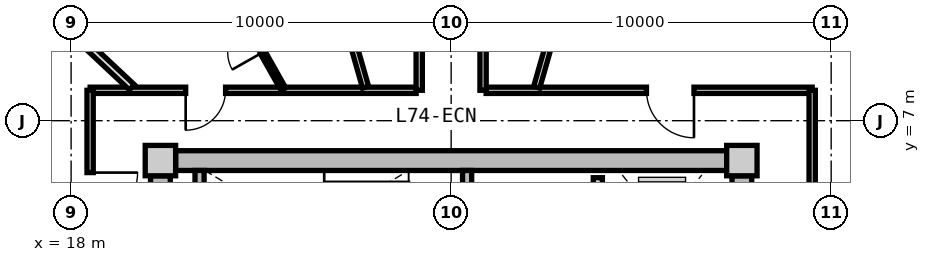
"""IFC4 building model, lengths in metres.
Left out: names, types, materials, properties, quantities, classifications, styles, units other than length and angle.
Written with IfcOpenShell. Run it as: python <this file> out.ifc"""

import sys

from ifc_helpers import new_model, si_unit, direction, frame, frame_2d, origin, origin_2d, place, context, subcontext, project, spatial, rectangle, extrude, source, transform, mapped, element, fill, save


model = new_model("IFC4")
c1 = context("Model", 3, precision=1e-05, world=origin(), true_north=direction((0.0, 1.0)))
c2 = subcontext(c1, "Body", "Model", "MODEL_VIEW")
j1 = project(units=[si_unit("LENGTHUNIT", "METRE"), si_unit("PLANEANGLEUNIT", "RADIAN")], contexts=[c1])
p1 = place(None, origin())
s1 = spatial("IfcSite", under=j1, at=p1, CompositionType="ELEMENT")
p2 = place(p1, origin())
s2 = spatial("IfcBuilding", under=s1, at=p2, CompositionType="ELEMENT")
p3 = place(p2, frame((0.0, 0.0, 238.3)))
s3 = spatial("IfcBuildingStorey", under=s2, at=p3, CompositionType="ELEMENT", Elevation=238.3)
m1 = source(origin(), c2, "Body", "SweptSolid", [
    extrude(rectangle(XDim=0.8, YDim=0.8, at=origin_2d()), origin(), (0.0, 0.0, 1.0), 3.05),
])
for number, where, z_axis, x_axis in (
    (1, (35.65, 5.95, 0.0), (0.0, 0.0, 1.0), (1.0, 0.0, 0.0)),
    (2, (20.35, 5.95, 0.0), (0.0, 0.0, 1.0), (1.0, 0.0, 0.0)),
):
    element("IfcColumn", number, at=place(p3, frame(where, z_axis=z_axis, x_axis=x_axis)), inside=s3, PredefinedType="COLUMN", context=c2, shape_type="MappedRepresentation", body=[
        mapped(m1, transform((0.0, 0.0, 0.0), x_axis=(1.0, 0.0, 0.0), y_axis=(0.0, 1.0, 0.0), z_axis=(0.0, 0.0, 1.0), scale=1.0)),
    ])
m2 = source(origin(), c2, "Body", "SweptSolid", [
    extrude(rectangle(XDim=14.5, YDim=0.52, at=frame_2d((7.25, 0.0))), origin(), (0.0, 0.0, 1.0), 2.81),
])
p4 = place(p3, frame((20.75, 5.95, 0.0), z_axis=(0.0, 0.0, 1.0), x_axis=(1.0, 0.0, 0.0)))
e3 = element("IfcWall", 3, at=p4, inside=s3, PredefinedType="SHEAR", context=c2, shape_type="MappedRepresentation", body=[
    mapped(m2, transform((0.0, 0.0, 0.0), x_axis=(1.0, 0.0, 0.0), y_axis=(0.0, 1.0, 0.0), z_axis=(0.0, 0.0, 1.0), scale=1.0)),
])
m3 = source(origin(), c2, "Body", "SweptSolid", [
    extrude(rectangle(XDim=11.1, YDim=0.52, at=frame_2d((5.55, 0.0))), origin(), (0.0, 0.0, 1.0), 2.81),
])
p5 = place(p3, frame((20.35, -5.55, 0.0), z_axis=(0.0, 0.0, 1.0), x_axis=(0.0, 1.0, 0.0)))
e4 = element("IfcWall", 4, at=p5, inside=s3, PredefinedType="SHEAR", context=c2, shape_type="MappedRepresentation", body=[
    mapped(m3, transform((0.0, 0.0, 0.0), x_axis=(1.0, 0.0, 0.0), y_axis=(0.0, 1.0, 0.0), z_axis=(0.0, 0.0, 1.0), scale=1.0)),
])
p6 = place(p5, frame((3.8, 0.0, 0.0)))
e5 = element("IfcOpeningElement", 5, at=p6, cuts=e4, PredefinedType="OPENING", context=c2, shape_type="SweptSolid", body=[
    extrude(rectangle(XDim=1.2, YDim=2.15, at=frame_2d((0.6, 1.075))), frame((0.0, 0.27, 0.0), z_axis=(0.0, -1.0, 0.0), x_axis=(1.0, 0.0, 0.0)), (0.0, 0.0, 1.0), 0.54),
])
p7 = place(p3, frame((35.65, 5.55, 0.0), z_axis=(0.0, 0.0, 1.0), x_axis=(0.0, -1.0, 0.0)))
e6 = element("IfcWall", 6, at=p7, inside=s3, PredefinedType="SHEAR", context=c2, shape_type="MappedRepresentation", body=[
    mapped(m3, transform((0.0, 0.0, 0.0), x_axis=(1.0, 0.0, 0.0), y_axis=(0.0, 1.0, 0.0), z_axis=(0.0, 0.0, 1.0), scale=1.0)),
])
p8 = place(p7, frame((5.65, 0.0, 0.0)))
e7 = element("IfcOpeningElement", 7, at=p8, cuts=e6, PredefinedType="OPENING", context=c2, shape_type="SweptSolid", body=[
    extrude(rectangle(XDim=1.2, YDim=2.15, at=frame_2d((0.6, 1.075))), frame((0.0, 0.27, 0.0), z_axis=(0.0, -1.0, 0.0), x_axis=(1.0, 0.0, 0.0)), (0.0, 0.0, 1.0), 0.54),
])
m4 = source(origin(), c2, "Body", "SweptSolid", [
    extrude(rectangle(XDim=3.24, YDim=0.24, at=frame_2d((1.62, 0.0))), origin(), (0.0, 0.0, 1.0), 2.81),
])
p9 = place(p3, frame((21.38, 2.45, 0.0), z_axis=(0.0, 0.0, 1.0), x_axis=(0.0, 1.0, 0.0)))
e8 = element("IfcWall", 8, at=p9, inside=s3, PredefinedType="PARTITIONING", context=c2, shape_type="MappedRepresentation", body=[
    mapped(m4, transform((0.0, 0.0, 0.0), x_axis=(1.0, 0.0, 0.0), y_axis=(0.0, 1.0, 0.0), z_axis=(0.0, 0.0, 1.0), scale=1.0)),
])
p10 = place(p3, frame((28.42, 2.45, 0.0), z_axis=(0.0, 0.0, 1.0), x_axis=(0.0, 1.0, 0.0)))
e9 = element("IfcWall", 9, at=p10, inside=s3, PredefinedType="PARTITIONING", context=c2, shape_type="MappedRepresentation", body=[
    mapped(m4, transform((0.0, 0.0, 0.0), x_axis=(1.0, 0.0, 0.0), y_axis=(0.0, 1.0, 0.0), z_axis=(0.0, 0.0, 1.0), scale=1.0)),
])
p11 = place(p10, frame((0.55, 0.0, 0.0)))
e10 = element("IfcOpeningElement", 10, at=p11, cuts=e9, PredefinedType="OPENING", context=c2, shape_type="SweptSolid", body=[
    extrude(rectangle(XDim=1.1, YDim=2.15, at=frame_2d((0.55, 1.075))), frame((0.0, 0.13, 0.0), z_axis=(0.0, -1.0, 0.0), x_axis=(1.0, 0.0, 0.0)), (0.0, 0.0, 1.0), 0.26),
])
m5 = source(origin(), c2, "Body", "SweptSolid", [
    extrude(rectangle(XDim=5.0, YDim=0.24, at=frame_2d((2.5, 0.0))), origin(), (0.0, 0.0, 1.0), 2.795),
])
p12 = place(p3, frame((31.86, 0.5, 0.0), z_axis=(0.0, 0.0, 1.0), x_axis=(0.0, 1.0, 0.0)))
e11 = element("IfcWall", 11, at=p12, inside=s3, PredefinedType="PARTITIONING", context=c2, shape_type="MappedRepresentation", body=[
    mapped(m5, transform((0.0, 0.0, 0.0), x_axis=(1.0, 0.0, 0.0), y_axis=(0.0, 1.0, 0.0), z_axis=(0.0, 0.0, 1.0), scale=1.0)),
])
p13 = place(p12, frame((3.05, 0.0, 0.0)))
e12 = element("IfcOpeningElement", 12, at=p13, cuts=e11, PredefinedType="OPENING", context=c2, shape_type="SweptSolid", body=[
    extrude(rectangle(XDim=1.3, YDim=2.2, at=frame_2d((0.65, 1.1))), frame((0.0, 0.13, 0.0), z_axis=(0.0, -1.0, 0.0), x_axis=(1.0, 0.0, 0.0)), (0.0, 0.0, 1.0), 0.26),
])
p14 = place(p12, frame((0.55, 0.0, 0.0)))
e13 = element("IfcOpeningElement", 13, at=p14, cuts=e11, PredefinedType="OPENING", context=c2, shape_type="SweptSolid", body=[
    extrude(rectangle(XDim=1.3, YDim=2.2, at=frame_2d((0.65, 1.1))), frame((0.0, 0.13, 0.0), z_axis=(0.0, -1.0, 0.0), x_axis=(1.0, 0.0, 0.0)), (0.0, 0.0, 1.0), 0.26),
])
m6 = source(origin(), c2, "Body", "SweptSolid", [
    extrude(rectangle(XDim=8.58, YDim=0.165, at=frame_2d((4.29, 0.0))), origin(), (0.0, 0.0, 1.0), 2.795),
])
p15 = place(p3, frame((18.5, 7.8, 0.0), z_axis=(0.0, 0.0, 1.0), x_axis=(1.0, 0.0, 0.0)))
e14 = element("IfcWall", 14, at=p15, inside=s3, PredefinedType="PARTITIONING", context=c2, shape_type="MappedRepresentation", body=[
    mapped(m6, transform((0.0, 0.0, 0.0), x_axis=(1.0, 0.0, 0.0), y_axis=(0.0, 1.0, 0.0), z_axis=(0.0, 0.0, 1.0), scale=1.0)),
])
p16 = place(p15, frame((2.515, 0.0, 0.0)))
e15 = element("IfcOpeningElement", 15, at=p16, cuts=e14, PredefinedType="OPENING", context=c2, shape_type="SweptSolid", body=[
    extrude(rectangle(XDim=1.05, YDim=2.15, at=frame_2d((0.525, 1.075))), frame((0.0, 0.093, 0.0), z_axis=(0.0, -1.0, 0.0), x_axis=(1.0, 0.0, 0.0)), (0.0, 0.0, 1.0), 0.185),
])
p17 = place(p3, frame((28.92, 7.8, 0.0), z_axis=(0.0, 0.0, 1.0), x_axis=(1.0, 0.0, 0.0)))
e16 = element("IfcWall", 16, at=p17, inside=s3, PredefinedType="PARTITIONING", context=c2, shape_type="MappedRepresentation", body=[
    mapped(m6, transform((0.0, 0.0, 0.0), x_axis=(1.0, 0.0, 0.0), y_axis=(0.0, 1.0, 0.0), z_axis=(0.0, 0.0, 1.0), scale=1.0)),
])
p18 = place(p17, frame((4.22, 0.0, 0.0)))
e17 = element("IfcOpeningElement", 17, at=p18, cuts=e16, PredefinedType="OPENING", context=c2, shape_type="SweptSolid", body=[
    extrude(rectangle(XDim=1.25, YDim=2.2, at=frame_2d((0.625, 1.1))), frame((0.0, 0.093, 0.0), z_axis=(0.0, -1.0, 0.0), x_axis=(1.0, 0.0, 0.0)), (0.0, 0.0, 1.0), 0.185),
])
m7 = source(origin(), c2, "Body", "SweptSolid", [
    extrude(rectangle(XDim=6.88, YDim=0.165, at=frame_2d((3.44, 0.0))), origin(), (0.0, 0.0, 1.0), 2.795),
])
p19 = place(p3, frame((18.5, 0.92, 0.0), z_axis=(0.0, 0.0, 1.0), x_axis=(0.0, 1.0, 0.0)))
e18 = element("IfcWall", 18, at=p19, inside=s3, PredefinedType="PARTITIONING", context=c2, shape_type="MappedRepresentation", body=[
    mapped(m7, transform((0.0, 0.0, 0.0), x_axis=(1.0, 0.0, 0.0), y_axis=(0.0, 1.0, 0.0), z_axis=(0.0, 0.0, 1.0), scale=1.0)),
])
p20 = place(p19, frame((3.464, 0.0, 0.0)))
e19 = element("IfcOpeningElement", 19, at=p20, cuts=e18, PredefinedType="OPENING", context=c2, shape_type="SweptSolid", body=[
    extrude(rectangle(XDim=1.25, YDim=2.2, at=frame_2d((0.625, 1.1))), frame((0.0, 0.093, 0.0), z_axis=(0.0, -1.0, 0.0), x_axis=(1.0, 0.0, 0.0)), (0.0, 0.0, 1.0), 0.185),
])
p21 = place(p3, frame((37.5, 7.8, 0.0), z_axis=(0.0, 0.0, 1.0), x_axis=(0.0, -1.0, 0.0)))
e20 = element("IfcWall", 20, at=p21, inside=s3, PredefinedType="PARTITIONING", context=c2, shape_type="MappedRepresentation", body=[
    mapped(m7, transform((0.0, 0.0, 0.0), x_axis=(1.0, 0.0, 0.0), y_axis=(0.0, 1.0, 0.0), z_axis=(0.0, 0.0, 1.0), scale=1.0)),
])
m8 = source(origin(), c2, "Body", "SweptSolid", [
    extrude(rectangle(XDim=6.974, YDim=0.165, at=frame_2d((3.487, 0.0))), origin(), (0.0, 0.0, 1.0), 2.395),
])
for number, where, z_axis, x_axis in (
    (21, (30.251, 7.88, 0.0), (0.0, 0.0, 1.0), (0.275, 0.962, 0.0)),
    (22, (25.749, 7.88, 0.0), (0.0, 0.0, 1.0), (-0.275, 0.962, 0.0)),
):
    element("IfcWall", number, at=place(p3, frame(where, z_axis=z_axis, x_axis=x_axis)), inside=s3, PredefinedType="PARTITIONING", context=c2, shape_type="MappedRepresentation", body=[
        mapped(m8, transform((0.0, 0.0, 0.0), x_axis=(1.0, 0.0, 0.0), y_axis=(0.0, 1.0, 0.0), z_axis=(0.0, 0.0, 1.0), scale=1.0)),
    ])
m9 = source(origin(), c2, "Body", "SweptSolid", [
    extrude(rectangle(XDim=6.835, YDim=0.165, at=frame_2d((3.418, 0.0))), origin(), (0.0, 0.0, 1.0), 2.795),
])
p22 = place(p3, frame((27.16, 7.8, 0.0), z_axis=(0.0, 0.0, 1.0), x_axis=(0.0, 1.0, 0.0)))
e23 = element("IfcWall", 23, at=p22, inside=s3, PredefinedType="PARTITIONING", context=c2, shape_type="MappedRepresentation", body=[
    mapped(m9, transform((0.0, 0.0, 0.0), x_axis=(1.0, 0.0, 0.0), y_axis=(0.0, 1.0, 0.0), z_axis=(0.0, 0.0, 1.0), scale=1.0)),
])
p23 = place(p22, frame((2.943, 0.0, 0.0)))
e24 = element("IfcOpeningElement", 24, at=p23, cuts=e23, PredefinedType="OPENING", context=c2, shape_type="SweptSolid", body=[
    extrude(rectangle(XDim=0.95, YDim=2.1, at=frame_2d((0.475, 1.05))), frame((0.0, 0.093, 0.0), z_axis=(0.0, -1.0, 0.0), x_axis=(1.0, 0.0, 0.0)), (0.0, 0.0, 1.0), 0.185),
])
p24 = place(p3, frame((28.84, 14.635, 0.0), z_axis=(0.0, 0.0, 1.0), x_axis=(0.0, -1.0, 0.0)))
e25 = element("IfcWall", 25, at=p24, inside=s3, PredefinedType="PARTITIONING", context=c2, shape_type="MappedRepresentation", body=[
    mapped(m9, transform((0.0, 0.0, 0.0), x_axis=(1.0, 0.0, 0.0), y_axis=(0.0, 1.0, 0.0), z_axis=(0.0, 0.0, 1.0), scale=1.0)),
])
p25 = place(p24, frame((2.943, 0.0, 0.0)))
e26 = element("IfcOpeningElement", 26, at=p25, cuts=e25, PredefinedType="OPENING", context=c2, shape_type="SweptSolid", body=[
    extrude(rectangle(XDim=0.95, YDim=2.1, at=frame_2d((0.475, 1.05))), frame((0.0, 0.093, 0.0), z_axis=(0.0, -1.0, 0.0), x_axis=(1.0, 0.0, 0.0)), (0.0, 0.0, 1.0), 0.185),
])
m10 = source(origin(), c2, "Body", "SweptSolid", [
    extrude(rectangle(XDim=4.089, YDim=0.19, at=frame_2d((2.044, 0.0))), origin(), (0.0, 0.0, 1.0), 2.395),
])
p26 = place(p3, frame((19.598, 7.88, 0.0), z_axis=(0.0, 0.0, 1.0), x_axis=(-0.729401273609, 0.684086092577, 0.0)))
e27 = element("IfcWall", 27, at=p26, inside=s3, PredefinedType="PARTITIONING", context=c2, shape_type="MappedRepresentation", body=[
    mapped(m10, transform((0.0, 0.0, 0.0), x_axis=(1.0, 0.0, 0.0), y_axis=(0.0, 1.0, 0.0), z_axis=(0.0, 0.0, 1.0), scale=1.0)),
])
m11 = source(origin(), c2, "Body", "SweptSolid", [
    extrude(rectangle(XDim=3.14, YDim=0.14, at=frame_2d((1.57, 0.0))), origin(), (0.0, 0.0, 1.0), 2.795),
])
p27 = place(p3, frame((23.585, 7.83, 0.0), z_axis=(0.0, 0.0, 1.0), x_axis=(-0.491132137966, 0.871085083707, 0.0)))
e28 = element("IfcWall", 28, at=p27, inside=s3, PredefinedType="PARTITIONING", context=c2, shape_type="MappedRepresentation", body=[
    mapped(m11, transform((0.0, 0.0, 0.0), x_axis=(1.0, 0.0, 0.0), y_axis=(0.0, 1.0, 0.0), z_axis=(0.0, 0.0, 1.0), scale=1.0)),
])
p28 = place(p27, frame((1.11, 0.0, 0.0)))
e29 = element("IfcOpeningElement", 29, at=p28, cuts=e28, PredefinedType="OPENING", context=c2, shape_type="SweptSolid", body=[
    extrude(rectangle(XDim=0.92, YDim=2.1, at=frame_2d((0.46, 1.05))), frame((0.0, 0.08, 0.0), z_axis=(0.0, -1.0, 0.0), x_axis=(1.0, 0.0, 0.0)), (0.0, 0.0, 1.0), 0.16),
])
m12 = source(origin(), c2, "Body", "SweptSolid", [
    extrude(rectangle(XDim=1.25, YDim=2.2, at=frame_2d((0.625, 1.1))), frame((0.0, 0.025, 0.0), z_axis=(0.0, -1.0, 0.0), x_axis=(1.0, 0.0, 0.0)), (0.0, 0.0, 1.0), 0.05),
])
p29 = place(p18, frame((1.25, 0.0, 0.0), z_axis=(0.0, 0.0, 1.0), x_axis=(-1.0, 0.0, 0.0)))
e30 = element("IfcDoor", 30, at=p29, inside=s3, OperationType="SINGLE_SWING_LEFT", PredefinedType="DOOR", context=c2, shape_type="MappedRepresentation", body=[
    mapped(m12, transform((0.0, 0.0, 0.0), x_axis=(1.0, 0.0, 0.0), y_axis=(0.0, 1.0, 0.0), z_axis=(0.0, 0.0, 1.0), scale=1.0)),
])
fill(e17, e30)
m13 = source(origin(), c2, "Body", "SweptSolid", [
    extrude(rectangle(XDim=1.05, YDim=2.15, at=frame_2d((0.525, 1.075))), frame((0.0, 0.025, 0.0), z_axis=(0.0, -1.0, 0.0), x_axis=(1.0, 0.0, 0.0)), (0.0, 0.0, 1.0), 0.05),
])
p30 = place(p16, frame((1.05, 0.0, 0.0), z_axis=(0.0, 0.0, 1.0), x_axis=(-1.0, 0.0, 0.0)))
e31 = element("IfcDoor", 31, at=p30, inside=s3, OperationType="SINGLE_SWING_RIGHT", PredefinedType="DOOR", context=c2, shape_type="MappedRepresentation", body=[
    mapped(m13, transform((0.0, 0.0, 0.0), x_axis=(1.0, 0.0, 0.0), y_axis=(0.0, 1.0, 0.0), z_axis=(0.0, 0.0, 1.0), scale=1.0)),
])
fill(e15, e31)
m14 = source(origin(), c2, "Body", "SweptSolid", [
    extrude(rectangle(XDim=0.92, YDim=2.1, at=frame_2d((0.46, 1.05))), frame((0.0, 0.025, 0.0), z_axis=(0.0, -1.0, 0.0), x_axis=(1.0, 0.0, 0.0)), (0.0, 0.0, 1.0), 0.05),
])
p31 = place(p28, origin())
e32 = element("IfcDoor", 32, at=p31, inside=s3, OperationType="SINGLE_SWING_LEFT", PredefinedType="DOOR", context=c2, shape_type="MappedRepresentation", body=[
    mapped(m14, transform((0.0, 0.0, 0.0), x_axis=(1.0, 0.0, 0.0), y_axis=(0.0, 1.0, 0.0), z_axis=(0.0, 0.0, 1.0), scale=1.0)),
])
fill(e29, e32)
p32 = place(p20, frame((1.25, 0.0, 0.0), z_axis=(0.0, 0.0, 1.0), x_axis=(-1.0, 0.0, 0.0)))
e33 = element("IfcDoor", 33, at=p32, inside=s3, OperationType="SINGLE_SWING_LEFT", PredefinedType="DOOR", context=c2, shape_type="MappedRepresentation", body=[
    mapped(m12, transform((0.0, 0.0, 0.0), x_axis=(1.0, 0.0, 0.0), y_axis=(0.0, 1.0, 0.0), z_axis=(0.0, 0.0, 1.0), scale=1.0)),
])
fill(e19, e33)
save(model, sys.argv[1])
